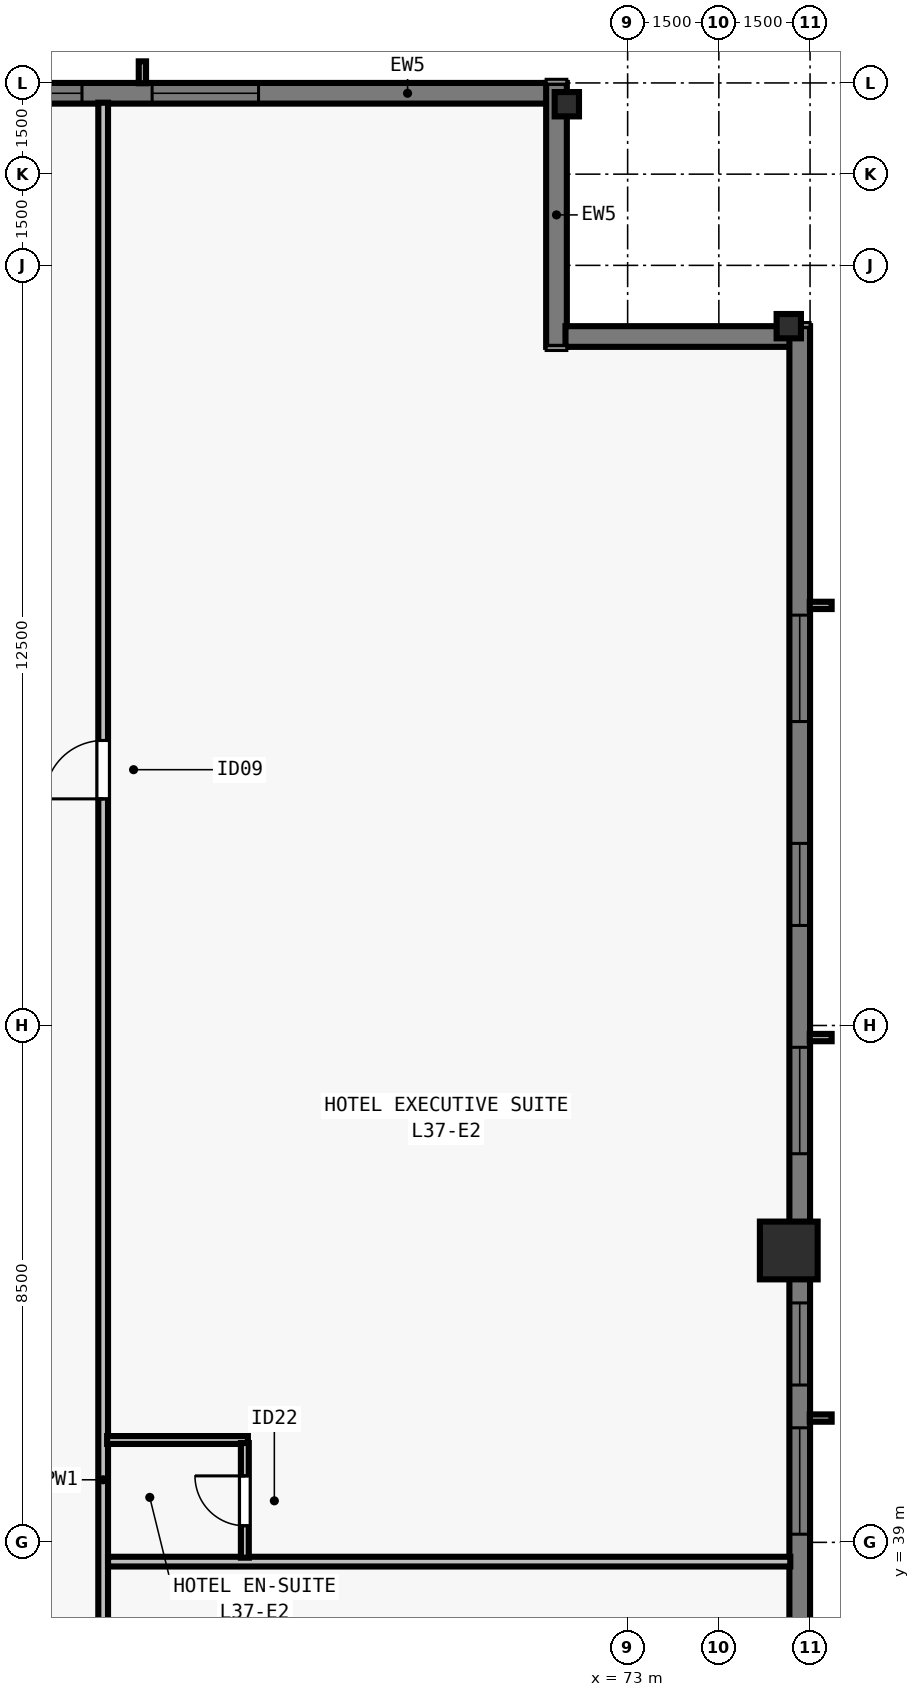
"""IFC4 building model, lengths in metres.
Left out: names, types, materials, properties, quantities, classifications, styles, units other than length and angle.
Written with IfcOpenShell. Run it as: python <this file> out.ifc"""

import sys

from ifc_helpers import new_model, si_unit, direction, frame, frame_2d, origin, origin_2d, place, context, subcontext, project, spatial, rectangle, i_section, extrude, element, fill, save


model = new_model("IFC4")
c1 = context("Model", 3, precision=1e-05, world=origin(), true_north=direction((0.0, 1.0)))
c2 = subcontext(c1, "Body", "Model", "MODEL_VIEW")
j1 = project(units=[si_unit("LENGTHUNIT", "METRE"), si_unit("PLANEANGLEUNIT", "RADIAN")], contexts=[c1])
p1 = place(None, origin())
s1 = spatial("IfcSite", under=j1, at=p1, CompositionType="ELEMENT")
p2 = place(p1, origin())
s2 = spatial("IfcBuilding", under=s1, at=p2, CompositionType="ELEMENT")
p3 = place(p2, frame((0.0, 0.0, 137.5)))
s3 = spatial("IfcBuildingStorey", under=s2, at=p3, CompositionType="ELEMENT", Elevation=137.5)
p4 = place(p3, frame((75.65, 43.8, 0.0), z_axis=(0.0, 0.0, 1.0), x_axis=(0.0, 1.0, 0.0)))
e1 = element("IfcColumn", 1, at=p4, inside=s3, PredefinedType="COLUMN", context=c2, shape_type="SweptSolid", body=[
    extrude(rectangle(XDim=0.95, YDim=0.95, at=origin_2d()), origin(), (0.0, 0.0, 1.0), 3.5),
])
for number, where, z_axis, x_axis in (
    (2, (75.65, 59.0, 0.0), (0.0, 0.0, 1.0), (0.0, 1.0, 0.0)),
    (3, (72.0, 62.65, 0.0), (0.0, 0.0, 1.0), (1.0, 0.0, 0.0)),
):
    element("IfcColumn", number, at=place(p3, frame(where, z_axis=z_axis, x_axis=x_axis)), inside=s3, PredefinedType="COLUMN", context=c2, shape_type="SweptSolid", body=[
        extrude(i_section(OverallWidth=0.4, OverallDepth=0.4, WebThickness=0.022, FlangeThickness=0.036, at=origin_2d()), origin(), (0.0, 0.0, 1.0), 3.5),
    ])
p5 = place(p3, frame((32.0, 62.83, 0.0), z_axis=(0.0, 0.0, 1.0), x_axis=(1.0, 0.0, 0.0)))
e4 = element("IfcWall", 4, at=p5, inside=s3, PredefinedType="SOLIDWALL", context=c2, shape_type="SweptSolid", body=[
    extrude(rectangle(XDim=39.682, YDim=0.34, at=frame_2d((19.841, 0.0))), origin(), (0.0, 0.0, 1.0), 3.28),
])
p6 = place(p5, frame((3.902, 0.0, 0.8)))
e5 = element("IfcOpeningElement", 5, at=p6, cuts=e4, PredefinedType="OPENING", context=c2, shape_type="SweptSolid", body=[
    extrude(rectangle(XDim=1.75, YDim=1.66, at=frame_2d((0.875, 0.83))), frame((0.0, 0.18, 0.0), z_axis=(0.0, -1.0, 0.0), x_axis=(1.0, 0.0, 0.0)), (0.0, 0.0, 1.0), 0.36),
])
p7 = place(p5, frame((8.505, 0.0, 0.8)))
e6 = element("IfcOpeningElement", 6, at=p7, cuts=e4, PredefinedType="OPENING", context=c2, shape_type="SweptSolid", body=[
    extrude(rectangle(XDim=1.35, YDim=1.66, at=frame_2d((0.675, 0.83))), frame((0.0, 0.18, 0.0), z_axis=(0.0, -1.0, 0.0), x_axis=(1.0, 0.0, 0.0)), (0.0, 0.0, 1.0), 0.36),
])
p8 = place(p5, frame((11.859, 0.0, 0.8)))
e7 = element("IfcOpeningElement", 7, at=p8, cuts=e4, PredefinedType="OPENING", context=c2, shape_type="SweptSolid", body=[
    extrude(rectangle(XDim=1.75, YDim=1.66, at=frame_2d((0.875, 0.83))), frame((0.0, 0.18, 0.0), z_axis=(0.0, -1.0, 0.0), x_axis=(1.0, 0.0, 0.0)), (0.0, 0.0, 1.0), 0.36),
])
p9 = place(p5, frame((16.062, 0.0, 0.8)))
e8 = element("IfcOpeningElement", 8, at=p9, cuts=e4, PredefinedType="OPENING", context=c2, shape_type="SweptSolid", body=[
    extrude(rectangle(XDim=1.35, YDim=1.66, at=frame_2d((0.675, 0.83))), frame((0.0, 0.18, 0.0), z_axis=(0.0, -1.0, 0.0), x_axis=(1.0, 0.0, 0.0)), (0.0, 0.0, 1.0), 0.36),
])
p10 = place(p5, frame((17.716, 0.0, 0.8)))
e9 = element("IfcOpeningElement", 9, at=p10, cuts=e4, PredefinedType="OPENING", context=c2, shape_type="SweptSolid", body=[
    extrude(rectangle(XDim=1.75, YDim=1.66, at=frame_2d((0.875, 0.83))), frame((0.0, 0.18, 0.0), z_axis=(0.0, -1.0, 0.0), x_axis=(1.0, 0.0, 0.0)), (0.0, 0.0, 1.0), 0.36),
])
p11 = place(p5, frame((22.719, 0.0, 0.8)))
e10 = element("IfcOpeningElement", 10, at=p11, cuts=e4, PredefinedType="OPENING", context=c2, shape_type="SweptSolid", body=[
    extrude(rectangle(XDim=1.35, YDim=1.66, at=frame_2d((0.675, 0.83))), frame((0.0, 0.18, 0.0), z_axis=(0.0, -1.0, 0.0), x_axis=(1.0, 0.0, 0.0)), (0.0, 0.0, 1.0), 0.36),
])
p12 = place(p5, frame((26.073, 0.0, 0.8)))
e11 = element("IfcOpeningElement", 11, at=p12, cuts=e4, PredefinedType="OPENING", context=c2, shape_type="SweptSolid", body=[
    extrude(rectangle(XDim=1.75, YDim=1.66, at=frame_2d((0.875, 0.83))), frame((0.0, 0.18, 0.0), z_axis=(0.0, -1.0, 0.0), x_axis=(1.0, 0.0, 0.0)), (0.0, 0.0, 1.0), 0.36),
])
p13 = place(p5, frame((30.677, 0.0, 0.8)))
e12 = element("IfcOpeningElement", 12, at=p13, cuts=e4, PredefinedType="OPENING", context=c2, shape_type="SweptSolid", body=[
    extrude(rectangle(XDim=1.35, YDim=1.66, at=frame_2d((0.675, 0.83))), frame((0.0, 0.18, 0.0), z_axis=(0.0, -1.0, 0.0), x_axis=(1.0, 0.0, 0.0)), (0.0, 0.0, 1.0), 0.36),
])
p14 = place(p5, frame((33.18, 0.0, 0.8)))
e13 = element("IfcOpeningElement", 13, at=p14, cuts=e4, PredefinedType="OPENING", context=c2, shape_type="SweptSolid", body=[
    extrude(rectangle(XDim=1.75, YDim=1.66, at=frame_2d((0.875, 0.83))), frame((0.0, 0.18, 0.0), z_axis=(0.0, -1.0, 0.0), x_axis=(1.0, 0.0, 0.0)), (0.0, 0.0, 1.0), 0.36),
])
p15 = place(p3, frame((71.83, 63.0, 0.0), z_axis=(0.0, 0.0, 1.0), x_axis=(0.0, -1.0, 0.0)))
e14 = element("IfcWall", 14, at=p15, inside=s3, PredefinedType="SOLIDWALL", context=c2, shape_type="SweptSolid", body=[
    extrude(rectangle(XDim=4.34, YDim=0.34, at=frame_2d((2.17, 0.0))), origin(), (0.0, 0.0, 1.0), 3.28),
])
p16 = place(p3, frame((71.978, 58.83, 0.0), z_axis=(0.0, 0.0, 1.0), x_axis=(1.0, 0.0, 0.0)))
e15 = element("IfcWall", 15, at=p16, inside=s3, PredefinedType="SOLIDWALL", context=c2, shape_type="SweptSolid", body=[
    extrude(rectangle(XDim=3.704, YDim=0.34, at=frame_2d((1.852, 0.0))), origin(), (0.0, 0.0, 1.0), 3.28),
])
p17 = place(p3, frame((75.83, 59.0, 0.0), z_axis=(0.0, 0.0, 1.0), x_axis=(0.0, -1.0, 0.0)))
e16 = element("IfcWall", 16, at=p17, inside=s3, PredefinedType="SOLIDWALL", context=c2, shape_type="SweptSolid", body=[
    extrude(rectangle(XDim=39.682, YDim=0.34, at=frame_2d((19.841, 0.0))), origin(), (0.0, 0.0, 1.0), 3.28),
])
p18 = place(p17, frame((4.752, 0.0, 0.8)))
e17 = element("IfcOpeningElement", 17, at=p18, cuts=e16, PredefinedType="OPENING", context=c2, shape_type="SweptSolid", body=[
    extrude(rectangle(XDim=1.75, YDim=1.66, at=frame_2d((0.875, 0.83))), frame((0.0, 0.18, 0.0), z_axis=(0.0, -1.0, 0.0), x_axis=(1.0, 0.0, 0.0)), (0.0, 0.0, 1.0), 0.36),
])
p19 = place(p17, frame((8.505, 0.0, 0.8)))
e18 = element("IfcOpeningElement", 18, at=p19, cuts=e16, PredefinedType="OPENING", context=c2, shape_type="SweptSolid", body=[
    extrude(rectangle(XDim=1.35, YDim=1.66, at=frame_2d((0.675, 0.83))), frame((0.0, 0.18, 0.0), z_axis=(0.0, -1.0, 0.0), x_axis=(1.0, 0.0, 0.0)), (0.0, 0.0, 1.0), 0.36),
])
p20 = place(p17, frame((11.859, 0.0, 0.8)))
e19 = element("IfcOpeningElement", 19, at=p20, cuts=e16, PredefinedType="OPENING", context=c2, shape_type="SweptSolid", body=[
    extrude(rectangle(XDim=1.75, YDim=1.66, at=frame_2d((0.875, 0.83))), frame((0.0, 0.18, 0.0), z_axis=(0.0, -1.0, 0.0), x_axis=(1.0, 0.0, 0.0)), (0.0, 0.0, 1.0), 0.36),
])
p21 = place(p17, frame((16.062, 0.0, 0.8)))
e20 = element("IfcOpeningElement", 20, at=p21, cuts=e16, PredefinedType="OPENING", context=c2, shape_type="SweptSolid", body=[
    extrude(rectangle(XDim=1.35, YDim=1.66, at=frame_2d((0.675, 0.83))), frame((0.0, 0.18, 0.0), z_axis=(0.0, -1.0, 0.0), x_axis=(1.0, 0.0, 0.0)), (0.0, 0.0, 1.0), 0.36),
])
p22 = place(p17, frame((18.116, 0.0, 0.8)))
e21 = element("IfcOpeningElement", 21, at=p22, cuts=e16, PredefinedType="OPENING", context=c2, shape_type="SweptSolid", body=[
    extrude(rectangle(XDim=1.75, YDim=1.66, at=frame_2d((0.875, 0.83))), frame((0.0, 0.18, 0.0), z_axis=(0.0, -1.0, 0.0), x_axis=(1.0, 0.0, 0.0)), (0.0, 0.0, 1.0), 0.36),
])
p23 = place(p17, frame((22.719, 0.0, 0.8)))
e22 = element("IfcOpeningElement", 22, at=p23, cuts=e16, PredefinedType="OPENING", context=c2, shape_type="SweptSolid", body=[
    extrude(rectangle(XDim=1.35, YDim=1.66, at=frame_2d((0.675, 0.83))), frame((0.0, 0.18, 0.0), z_axis=(0.0, -1.0, 0.0), x_axis=(1.0, 0.0, 0.0)), (0.0, 0.0, 1.0), 0.36),
])
p24 = place(p17, frame((26.073, 0.0, 0.8)))
e23 = element("IfcOpeningElement", 23, at=p24, cuts=e16, PredefinedType="OPENING", context=c2, shape_type="SweptSolid", body=[
    extrude(rectangle(XDim=1.75, YDim=1.66, at=frame_2d((0.875, 0.83))), frame((0.0, 0.18, 0.0), z_axis=(0.0, -1.0, 0.0), x_axis=(1.0, 0.0, 0.0)), (0.0, 0.0, 1.0), 0.36),
])
p25 = place(p17, frame((29.827, 0.0, 0.8)))
e24 = element("IfcOpeningElement", 24, at=p25, cuts=e16, PredefinedType="OPENING", context=c2, shape_type="SweptSolid", body=[
    extrude(rectangle(XDim=1.35, YDim=1.66, at=frame_2d((0.675, 0.83))), frame((0.0, 0.18, 0.0), z_axis=(0.0, -1.0, 0.0), x_axis=(1.0, 0.0, 0.0)), (0.0, 0.0, 1.0), 0.36),
])
p26 = place(p17, frame((33.18, 0.0, 0.8)))
e25 = element("IfcOpeningElement", 25, at=p26, cuts=e16, PredefinedType="OPENING", context=c2, shape_type="SweptSolid", body=[
    extrude(rectangle(XDim=1.75, YDim=1.66, at=frame_2d((0.875, 0.83))), frame((0.0, 0.18, 0.0), z_axis=(0.0, -1.0, 0.0), x_axis=(1.0, 0.0, 0.0)), (0.0, 0.0, 1.0), 0.36),
])
p27 = place(p3, frame((64.375, 15.325, 0.0), z_axis=(0.0, 0.0, 1.0), x_axis=(0.0, 1.0, 0.0)))
e26 = element("IfcWall", 26, at=p27, inside=s3, PredefinedType="PARTITIONING", context=c2, shape_type="SweptSolid", body=[
    extrude(rectangle(XDim=47.35, YDim=0.16, at=frame_2d((23.675, 0.0))), origin(), (0.0, 0.0, 1.0), 2.555),
])
p28 = place(p27, frame((12.547, 0.0, 0.0)))
e27 = element("IfcOpeningElement", 27, at=p28, cuts=e26, PredefinedType="OPENING", context=c2, shape_type="SweptSolid", body=[
    extrude(rectangle(XDim=0.96, YDim=2.15, at=frame_2d((0.48, 1.075))), frame((0.0, 0.09, 0.0), z_axis=(0.0, -1.0, 0.0), x_axis=(1.0, 0.0, 0.0)), (0.0, 0.0, 1.0), 0.18),
])
p29 = place(p27, frame((35.902, 0.0, 0.0)))
e28 = element("IfcOpeningElement", 28, at=p29, cuts=e26, PredefinedType="OPENING", context=c2, shape_type="SweptSolid", body=[
    extrude(rectangle(XDim=0.96, YDim=2.15, at=frame_2d((0.48, 1.075))), frame((0.0, 0.09, 0.0), z_axis=(0.0, -1.0, 0.0), x_axis=(1.0, 0.0, 0.0)), (0.0, 0.0, 1.0), 0.18),
])
p30 = place(p3, frame((64.455, 38.683, 0.0), z_axis=(0.0, 0.0, 1.0), x_axis=(1.0, 0.0, 0.0)))
e29 = element("IfcWall", 29, at=p30, inside=s3, PredefinedType="PARTITIONING", context=c2, shape_type="SweptSolid", body=[
    extrude(rectangle(XDim=11.22, YDim=0.16, at=frame_2d((5.61, 0.0))), origin(), (0.0, 0.0, 1.0), 3.28),
])
p31 = place(p3, frame((64.44, 40.683, 0.0), z_axis=(0.0, 0.0, 1.0), x_axis=(1.0, 0.0, 0.0)))
e30 = element("IfcWall", 30, at=p31, inside=s3, PredefinedType="PLUMBINGWALL", context=c2, shape_type="SweptSolid", body=[
    extrude(rectangle(XDim=2.315, YDim=0.13, at=frame_2d((1.157, 0.0))), origin(), (0.0, 0.0, 1.0), 3.28),
])
p32 = place(p3, frame((66.705, 38.748, 0.0), z_axis=(0.0, 0.0, 1.0), x_axis=(0.0, 1.0, 0.0)))
e31 = element("IfcWall", 31, at=p32, inside=s3, PredefinedType="PLUMBINGWALL", context=c2, shape_type="SweptSolid", body=[
    extrude(rectangle(XDim=1.885, YDim=0.13, at=frame_2d((0.942, 0.0))), origin(), (0.0, 0.0, 1.0), 3.28),
])
p33 = place(p32, frame((0.525, 0.0, 0.0)))
e32 = element("IfcOpeningElement", 32, at=p33, cuts=e31, PredefinedType="OPENING", context=c2, shape_type="SweptSolid", body=[
    extrude(rectangle(XDim=0.82, YDim=2.1, at=frame_2d((0.41, 1.05))), frame((0.0, 0.075, 0.0), z_axis=(0.0, -1.0, 0.0), x_axis=(1.0, 0.0, 0.0)), (0.0, 0.0, 1.0), 0.15),
])
p34 = place(p13, origin())
e33 = element("IfcWindow", 33, at=p34, inside=s3, PartitioningType="SINGLE_PANEL", PredefinedType="WINDOW", context=c2, shape_type="SweptSolid", body=[
    extrude(rectangle(XDim=1.35, YDim=1.66, at=frame_2d((0.675, 0.83))), frame((0.0, -0.05, 0.0), z_axis=(0.0, -1.0, 0.0), x_axis=(1.0, 0.0, 0.0)), (0.0, 0.0, 1.0), 0.06),
])
fill(e12, e33)
p35 = place(p14, origin())
e34 = element("IfcWindow", 34, at=p35, inside=s3, PartitioningType="SINGLE_PANEL", PredefinedType="WINDOW", context=c2, shape_type="SweptSolid", body=[
    extrude(rectangle(XDim=1.75, YDim=1.66, at=frame_2d((0.875, 0.83))), frame((0.0, -0.05, 0.0), z_axis=(0.0, -1.0, 0.0), x_axis=(1.0, 0.0, 0.0)), (0.0, 0.0, 1.0), 0.06),
])
fill(e13, e34)
p36 = place(p18, origin())
e35 = element("IfcWindow", 35, at=p36, inside=s3, PartitioningType="SINGLE_PANEL", PredefinedType="WINDOW", context=c2, shape_type="SweptSolid", body=[
    extrude(rectangle(XDim=1.75, YDim=1.66, at=frame_2d((0.875, 0.83))), frame((0.0, -0.05, 0.0), z_axis=(0.0, -1.0, 0.0), x_axis=(1.0, 0.0, 0.0)), (0.0, 0.0, 1.0), 0.06),
])
fill(e17, e35)
p37 = place(p19, origin())
e36 = element("IfcWindow", 36, at=p37, inside=s3, PartitioningType="SINGLE_PANEL", PredefinedType="WINDOW", context=c2, shape_type="SweptSolid", body=[
    extrude(rectangle(XDim=1.35, YDim=1.66, at=frame_2d((0.675, 0.83))), frame((0.0, -0.05, 0.0), z_axis=(0.0, -1.0, 0.0), x_axis=(1.0, 0.0, 0.0)), (0.0, 0.0, 1.0), 0.06),
])
fill(e18, e36)
p38 = place(p20, origin())
e37 = element("IfcWindow", 37, at=p38, inside=s3, PartitioningType="SINGLE_PANEL", PredefinedType="WINDOW", context=c2, shape_type="SweptSolid", body=[
    extrude(rectangle(XDim=1.75, YDim=1.66, at=frame_2d((0.875, 0.83))), frame((0.0, -0.05, 0.0), z_axis=(0.0, -1.0, 0.0), x_axis=(1.0, 0.0, 0.0)), (0.0, 0.0, 1.0), 0.06),
])
fill(e19, e37)
p39 = place(p21, origin())
e38 = element("IfcWindow", 38, at=p39, inside=s3, PartitioningType="SINGLE_PANEL", PredefinedType="WINDOW", context=c2, shape_type="SweptSolid", body=[
    extrude(rectangle(XDim=1.35, YDim=1.66, at=frame_2d((0.675, 0.83))), frame((0.0, -0.05, 0.0), z_axis=(0.0, -1.0, 0.0), x_axis=(1.0, 0.0, 0.0)), (0.0, 0.0, 1.0), 0.06),
])
fill(e20, e38)
p40 = place(p22, origin())
e39 = element("IfcWindow", 39, at=p40, inside=s3, PartitioningType="SINGLE_PANEL", PredefinedType="WINDOW", context=c2, shape_type="SweptSolid", body=[
    extrude(rectangle(XDim=1.75, YDim=1.66, at=frame_2d((0.875, 0.83))), frame((0.0, -0.05, 0.0), z_axis=(0.0, -1.0, 0.0), x_axis=(1.0, 0.0, 0.0)), (0.0, 0.0, 1.0), 0.06),
])
fill(e21, e39)
p41 = place(p33, origin())
e40 = element("IfcDoor", 40, at=p41, inside=s3, OperationType="SINGLE_SWING_RIGHT", PredefinedType="DOOR", context=c2, shape_type="SweptSolid", body=[
    extrude(rectangle(XDim=0.82, YDim=2.1, at=frame_2d((0.41, 1.05))), frame((0.0, 0.025, 0.0), z_axis=(0.0, -1.0, 0.0), x_axis=(1.0, 0.0, 0.0)), (0.0, 0.0, 1.0), 0.05),
])
fill(e32, e40)
p42 = place(p29, origin())
e41 = element("IfcDoor", 41, at=p42, inside=s3, OperationType="SINGLE_SWING_LEFT", PredefinedType="DOOR", context=c2, shape_type="SweptSolid", body=[
    extrude(rectangle(XDim=0.96, YDim=2.15, at=frame_2d((0.48, 1.075))), frame((0.0, 0.025, 0.0), z_axis=(0.0, -1.0, 0.0), x_axis=(1.0, 0.0, 0.0)), (0.0, 0.0, 1.0), 0.05),
])
fill(e28, e41)
save(model, sys.argv[1])
